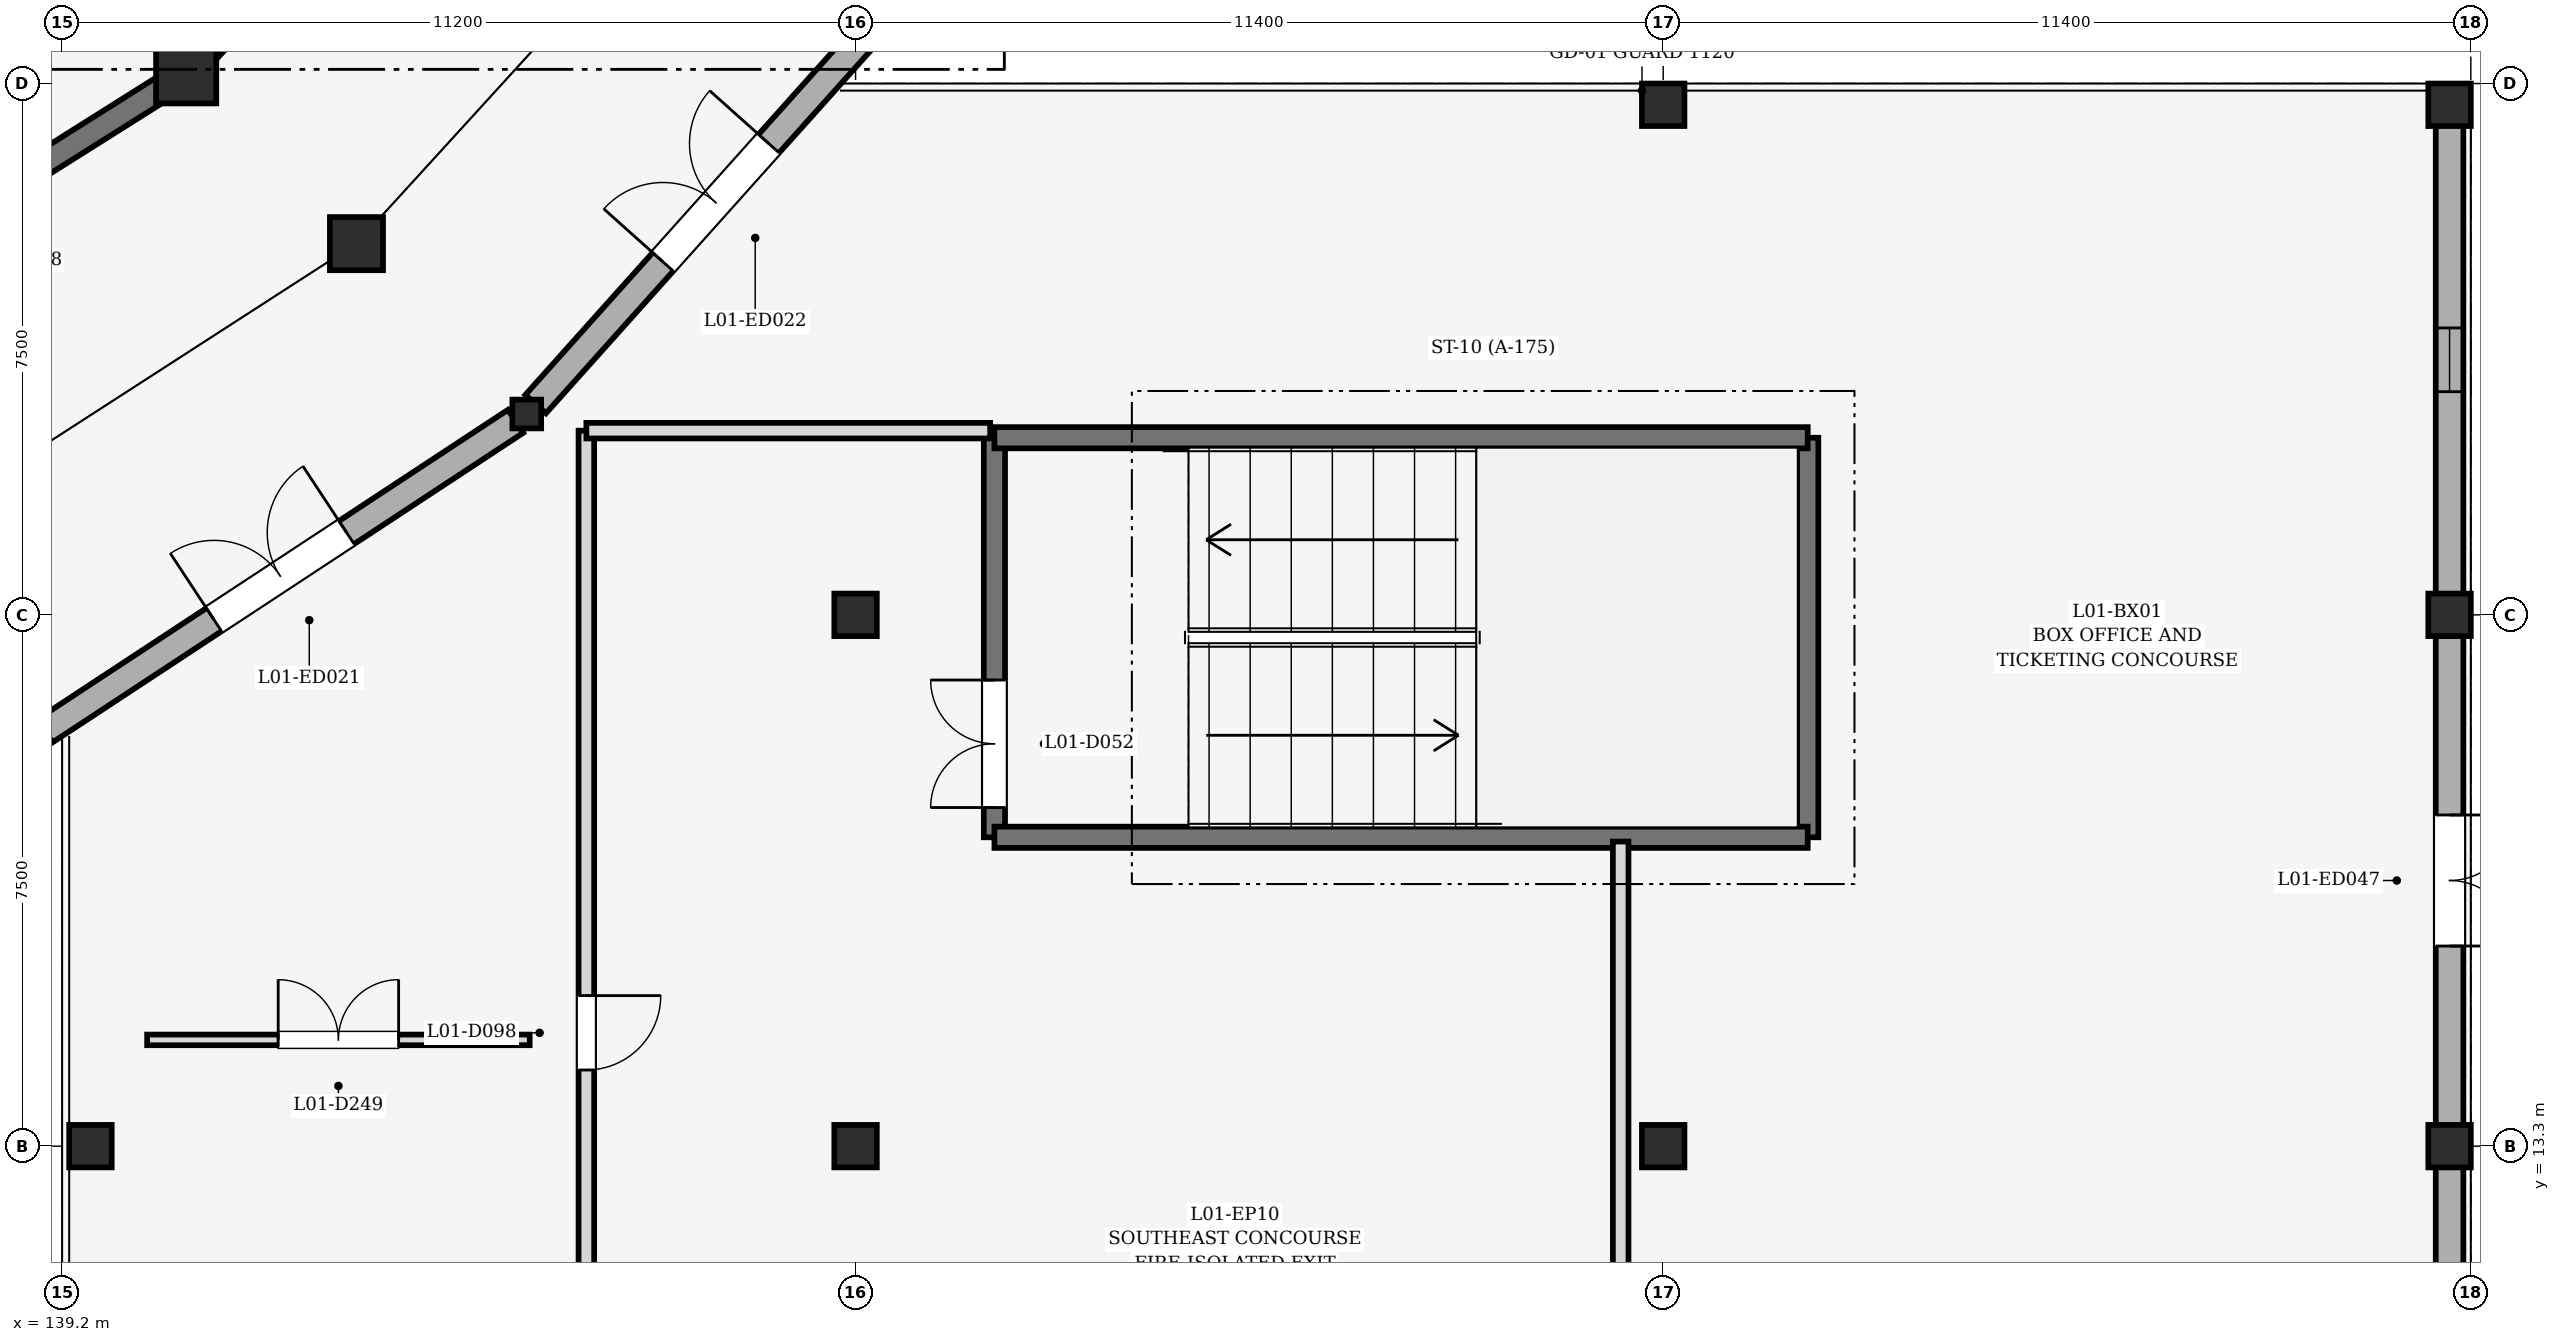
"""IFC4 building model, lengths in metres.
Left out: names, types, materials, properties, quantities, classifications, styles, units other than length and angle.
Written with IfcOpenShell. Run it as: python <this file> out.ifc"""

import sys

from ifc_helpers import new_model, si_unit, direction, frame, frame_2d, origin, origin_2d, place, context, subcontext, project, spatial, rectangle, circle, hollow_circle, extrude, element, fill, save


model = new_model("IFC4")
c1 = context("Model", 3, precision=1e-05, world=origin(), true_north=direction((0.0, 1.0)))
c2 = subcontext(c1, "Body", "Model", "MODEL_VIEW")
j1 = project(units=[si_unit("LENGTHUNIT", "METRE"), si_unit("PLANEANGLEUNIT", "RADIAN")], contexts=[c1])
p1 = place(None, origin())
s1 = spatial("IfcSite", under=j1, at=p1, CompositionType="ELEMENT")
p2 = place(p1, origin())
s2 = spatial("IfcBuilding", under=s1, at=p2, CompositionType="ELEMENT")
p3 = place(p2, origin())
s3 = spatial("IfcBuildingStorey", under=s2, at=p3, CompositionType="ELEMENT", Elevation=0.0)
p4 = place(p3, frame((140.951, 28.444, 0.0), z_axis=(0.0, 0.0, 1.0), x_axis=(1.0, 0.0, 0.0)))
e1 = element("IfcColumn", 1, at=p4, inside=s3, PredefinedType="COLUMN", context=c2, shape_type="SweptSolid", body=[
    extrude(circle(Radius=0.425, at=origin_2d()), origin(), (0.0, 0.0, 1.0), 5.4),
])
p5 = place(p3, frame((143.355, 26.04, 0.0), z_axis=(0.0, 0.0, 1.0), x_axis=(1.0, 0.0, 0.0)))
e2 = element("IfcColumn", 2, at=p5, inside=s3, PredefinedType="COLUMN", context=c2, shape_type="SweptSolid", body=[
    extrude(circle(Radius=0.375, at=origin_2d()), origin(), (0.0, 0.0, 1.0), 5.4),
])
p6 = place(p3, frame((145.759, 23.635, 0.0), z_axis=(0.0, 0.0, 1.0), x_axis=(1.0, 0.0, 0.0)))
e3 = element("IfcColumn", 3, at=p6, inside=s3, PredefinedType="COLUMN", context=c2, shape_type="SweptSolid", body=[
    extrude(hollow_circle(Radius=0.203, WallThickness=0.016, at=origin_2d()), origin(), (0.0, 0.0, 1.0), 5.4),
])
for number, where, z_axis, x_axis in (
    (4, (139.6, 13.3, 0.0), (0.0, 0.0, 1.0), (1.0, 0.0, 0.0)),
    (5, (150.4, 13.3, 0.0), (0.0, 0.0, 1.0), (1.0, 0.0, 0.0)),
    (6, (150.4, 20.8, 0.0), (0.0, 0.0, 1.0), (1.0, 0.0, 0.0)),
    (7, (161.8, 13.3, 0.0), (0.0, 0.0, 1.0), (1.0, 0.0, 0.0)),
    (8, (161.8, 28.0, 0.0), (0.0, 0.0, 1.0), (1.0, 0.0, 0.0)),
    (9, (172.9, 13.3, 0.0), (0.0, 0.0, 1.0), (1.0, 0.0, 0.0)),
    (10, (172.9, 20.8, 0.0), (0.0, 0.0, 1.0), (1.0, 0.0, 0.0)),
    (11, (172.9, 28.0, 0.0), (0.0, 0.0, 1.0), (1.0, 0.0, 0.0)),
):
    element("IfcColumn", number, at=place(p3, frame(where, z_axis=z_axis, x_axis=x_axis)), inside=s3, PredefinedType="COLUMN", context=c2, shape_type="SweptSolid", body=[
        extrude(rectangle(XDim=0.6, YDim=0.6, at=origin_2d()), origin(), (0.0, 0.0, 1.0), 5.4),
    ])
p7 = place(p3, frame((135.705, 25.139, 0.0), z_axis=(0.0, 0.0, 1.0), x_axis=(0.846151846743, 0.5329418845, 0.0)))
e12 = element("IfcWall", 12, at=p7, inside=s3, PredefinedType="SHEAR", context=c2, shape_type="SweptSolid", body=[
    extrude(rectangle(XDim=5.84, YDim=0.35, at=frame_2d((2.92, 0.0))), origin(), (0.0, 0.0, 1.0), 5.12),
])
p8 = place(p7, frame((2.36, 0.0, 0.0)))
e13 = element("IfcOpeningElement", 13, at=p8, cuts=e12, PredefinedType="OPENING", context=c2, shape_type="SweptSolid", body=[
    extrude(rectangle(XDim=1.12, YDim=2.26, at=frame_2d((0.56, 1.13))), frame((0.0, 0.187, 0.0), z_axis=(0.0, -1.0, 0.0), x_axis=(1.0, 0.0, 0.0)), (0.0, 0.0, 1.0), 0.374),
])
p9 = place(p3, frame((141.196, 28.707, 0.0), z_axis=(0.0, 0.0, 1.0), x_axis=(0.682874636689, 0.730535577893, 0.0)))
e14 = element("IfcWall", 14, at=p9, inside=s3, PredefinedType="SHEAR", context=c2, shape_type="SweptSolid", body=[
    extrude(rectangle(XDim=5.517, YDim=0.35, at=frame_2d((2.758, 0.0))), origin(), (0.0, 0.0, 1.0), 5.12),
])
p10 = place(p9, frame((2.198, 0.0, 0.0)))
e15 = element("IfcOpeningElement", 15, at=p10, cuts=e14, PredefinedType="OPENING", context=c2, shape_type="SweptSolid", body=[
    extrude(rectangle(XDim=1.12, YDim=2.26, at=frame_2d((0.56, 1.13))), frame((0.0, 0.187, 0.0), z_axis=(0.0, -1.0, 0.0), x_axis=(1.0, 0.0, 0.0)), (0.0, 0.0, 1.0), 0.374),
])
p11 = place(p3, frame((138.957, 19.162, 0.0), z_axis=(0.0, 0.0, 1.0), x_axis=(0.835481991605, 0.549517826556, 0.0)))
e16 = element("IfcWall", 16, at=p11, inside=s3, PredefinedType="STANDARD", context=c2, shape_type="SweptSolid", body=[
    extrude(rectangle(XDim=7.953, YDim=0.39, at=frame_2d((3.976, 0.0))), origin(), (0.0, 0.0, 1.0), 4.487),
])
p12 = place(p11, frame((2.856, 0.0, 0.0)))
e17 = element("IfcOpeningElement", 17, at=p12, cuts=e16, PredefinedType="OPENING", context=c2, shape_type="SweptSolid", body=[
    extrude(rectangle(XDim=2.24, YDim=2.35, at=frame_2d((1.12, 1.175))), frame((0.0, 0.207, 0.0), z_axis=(0.0, -1.0, 0.0), x_axis=(1.0, 0.0, 0.0)), (0.0, 0.0, 1.0), 0.414),
])
p13 = place(p3, frame((145.884, 23.775, 0.0), z_axis=(0.0, 0.0, 1.0), x_axis=(0.666987529742, 0.745068879479, 0.0)))
e18 = element("IfcWall", 18, at=p13, inside=s3, PredefinedType="STANDARD", context=c2, shape_type="SweptSolid", body=[
    extrude(rectangle(XDim=7.629, YDim=0.39, at=frame_2d((3.814, 0.0))), origin(), (0.0, 0.0, 1.0), 4.487),
])
p14 = place(p13, frame((2.695, 0.0, 0.0)))
e19 = element("IfcOpeningElement", 19, at=p14, cuts=e18, PredefinedType="OPENING", context=c2, shape_type="SweptSolid", body=[
    extrude(rectangle(XDim=2.24, YDim=2.35, at=frame_2d((1.12, 1.175))), frame((0.0, 0.207, 0.0), z_axis=(0.0, -1.0, 0.0), x_axis=(1.0, 0.0, 0.0)), (0.0, 0.0, 1.0), 0.414),
])
p15 = place(p3, frame((172.9, 13.015, 0.0), z_axis=(0.0, 0.0, 1.0), x_axis=(0.0, -1.0, 0.0)))
e20 = element("IfcWall", 20, at=p15, inside=s3, PredefinedType="STANDARD", context=c2, shape_type="SweptSolid", body=[
    extrude(rectangle(XDim=6.63, YDim=0.39, at=frame_2d((3.315, 0.0))), origin(), (0.0, 0.0, 1.0), 4.427),
])
p16 = place(p15, frame((2.555, 0.0, 0.85)))
e21 = element("IfcOpeningElement", 21, at=p16, cuts=e20, PredefinedType="OPENING", context=c2, shape_type="SweptSolid", body=[
    extrude(rectangle(XDim=1.52, YDim=1.75, at=frame_2d((0.76, 0.875))), frame((0.0, 0.207, 0.0), z_axis=(0.0, -1.0, 0.0), x_axis=(1.0, 0.0, 0.0)), (0.0, 0.0, 1.0), 0.414),
])
p17 = place(p3, frame((172.9, 20.515, 0.0), z_axis=(0.0, 0.0, 1.0), x_axis=(0.0, -1.0, 0.0)))
e22 = element("IfcWall", 22, at=p17, inside=s3, PredefinedType="STANDARD", context=c2, shape_type="SweptSolid", body=[
    extrude(rectangle(XDim=6.93, YDim=0.39, at=frame_2d((3.465, 0.0))), origin(), (0.0, 0.0, 1.0), 4.525),
])
p18 = place(p17, frame((2.54, 0.0, 0.0)))
e23 = element("IfcOpeningElement", 23, at=p18, cuts=e22, PredefinedType="OPENING", context=c2, shape_type="SweptSolid", body=[
    extrude(rectangle(XDim=1.85, YDim=2.25, at=frame_2d((0.925, 1.125))), frame((0.0, 0.207, 0.0), z_axis=(0.0, -1.0, 0.0), x_axis=(1.0, 0.0, 0.0)), (0.0, 0.0, 1.0), 0.414),
])
p19 = place(p3, frame((172.9, 27.715, 0.0), z_axis=(0.0, 0.0, 1.0), x_axis=(0.0, -1.0, 0.0)))
e24 = element("IfcWall", 24, at=p19, inside=s3, PredefinedType="STANDARD", context=c2, shape_type="SweptSolid", body=[
    extrude(rectangle(XDim=6.63, YDim=0.39, at=frame_2d((3.315, 0.0))), origin(), (0.0, 0.0, 1.0), 4.599),
])
p20 = place(p19, frame((2.865, 0.0, 0.85)))
e25 = element("IfcOpeningElement", 25, at=p20, cuts=e24, PredefinedType="OPENING", context=c2, shape_type="SweptSolid", body=[
    extrude(rectangle(XDim=0.9, YDim=1.5, at=frame_2d((0.45, 0.75))), frame((0.0, 0.207, 0.0), z_axis=(0.0, -1.0, 0.0), x_axis=(1.0, 0.0, 0.0)), (0.0, 0.0, 1.0), 0.414),
])
p21 = place(p3, frame((152.36, 17.66, 0.0), z_axis=(0.0, 0.0, 1.0), x_axis=(0.0, 1.0, 0.0)))
e26 = element("IfcWall", 26, at=p21, inside=s3, PredefinedType="SHEAR", context=c2, shape_type="SweptSolid", body=[
    extrude(rectangle(XDim=5.64, YDim=0.3, at=frame_2d((2.82, 0.0))), origin(), (0.0, 0.0, 1.0), 5.14),
])
p22 = place(p21, frame((0.42, 0.0, 0.0)))
e27 = element("IfcOpeningElement", 27, at=p22, cuts=e26, PredefinedType="OPENING", context=c2, shape_type="SweptSolid", body=[
    extrude(rectangle(XDim=1.8, YDim=2.2, at=frame_2d((0.9, 1.1))), frame((0.0, 0.162, 0.0), z_axis=(0.0, -1.0, 0.0), x_axis=(1.0, 0.0, 0.0)), (0.0, 0.0, 1.0), 0.324),
])
p23 = place(p3, frame((163.84, 23.3, 0.0), z_axis=(0.0, 0.0, 1.0), x_axis=(0.0, -1.0, 0.0)))
e28 = element("IfcWall", 28, at=p23, inside=s3, PredefinedType="SHEAR", context=c2, shape_type="SweptSolid", body=[
    extrude(rectangle(XDim=5.64, YDim=0.3, at=frame_2d((2.82, 0.0))), origin(), (0.0, 0.0, 1.0), 5.14),
])
for number, where, z_axis, x_axis in (
    (29, (163.84, 17.66, 0.0), (0.0, 0.0, 1.0), (-1.0, 0.0, 0.0)),
    (30, (152.36, 23.3, 0.0), (0.0, 0.0, 1.0), (1.0, 0.0, 0.0)),
):
    element("IfcWall", number, at=place(p3, frame(where, z_axis=z_axis, x_axis=x_axis)), inside=s3, PredefinedType="SHEAR", context=c2, shape_type="SweptSolid", body=[
        extrude(rectangle(XDim=11.48, YDim=0.3, at=frame_2d((5.74, 0.0))), origin(), (0.0, 0.0, 1.0), 5.14),
    ])
p24 = place(p3, frame((146.6, 23.4, 0.0), z_axis=(0.0, 0.0, 1.0), x_axis=(0.0, -1.0, 0.0)))
e31 = element("IfcWall", 31, at=p24, inside=s3, PredefinedType="SOLIDWALL", context=c2, shape_type="SweptSolid", body=[
    extrude(rectangle(XDim=17.0, YDim=0.22, at=frame_2d((8.5, 0.0))), origin(), (0.0, 0.0, 1.0), 5.125),
])
p25 = place(p24, frame((7.975, 0.0, 0.0)))
e32 = element("IfcOpeningElement", 32, at=p25, cuts=e31, PredefinedType="OPENING", context=c2, shape_type="SweptSolid", body=[
    extrude(rectangle(XDim=1.05, YDim=2.15, at=frame_2d((0.525, 1.075))), frame((0.0, 0.122, 0.0), z_axis=(0.0, -1.0, 0.0), x_axis=(1.0, 0.0, 0.0)), (0.0, 0.0, 1.0), 0.244),
])
p26 = place(p3, frame((152.3, 23.4, 0.0), z_axis=(0.0, 0.0, 1.0), x_axis=(-1.0, 0.0, 0.0)))
e33 = element("IfcWall", 33, at=p26, inside=s3, PredefinedType="SOLIDWALL", context=c2, shape_type="SweptSolid", body=[
    extrude(rectangle(XDim=5.7, YDim=0.22, at=frame_2d((2.85, 0.0))), origin(), (0.0, 0.0, 1.0), 5.125),
])
p27 = place(p3, frame((161.2, 6.4, 0.0), z_axis=(0.0, 0.0, 1.0), x_axis=(0.0, 1.0, 0.0)))
e34 = element("IfcWall", 34, at=p27, inside=s3, PredefinedType="SOLIDWALL", context=c2, shape_type="SweptSolid", body=[
    extrude(rectangle(XDim=11.2, YDim=0.22, at=frame_2d((5.6, 0.0))), origin(), (0.0, 0.0, 1.0), 5.125),
])
p28 = place(p3, frame((140.4, 14.8, 0.0), z_axis=(0.0, 0.0, 1.0), x_axis=(1.0, 0.0, 0.0)))
e35 = element("IfcWall", 35, at=p28, inside=s3, PredefinedType="PARTITIONING", context=c2, shape_type="SweptSolid", body=[
    extrude(rectangle(XDim=5.4, YDim=0.15, at=frame_2d((2.7, 0.0))), origin(), (0.0, 0.0, 1.0), 5.125),
])
p29 = place(p28, frame((1.85, 0.0, 0.0)))
e36 = element("IfcOpeningElement", 36, at=p29, cuts=e35, PredefinedType="OPENING", context=c2, shape_type="SweptSolid", body=[
    extrude(rectangle(XDim=1.7, YDim=2.2, at=frame_2d((0.85, 1.1))), frame((0.0, 0.087, 0.0), z_axis=(0.0, -1.0, 0.0), x_axis=(1.0, 0.0, 0.0)), (0.0, 0.0, 1.0), 0.174),
])
p30 = place(p12, origin())
e37 = element("IfcDoor", 37, at=p30, inside=s3, OperationType="DOUBLE_DOOR_SINGLE_SWING", PredefinedType="DOOR", context=c2, shape_type="SweptSolid", body=[
    extrude(rectangle(XDim=2.24, YDim=2.35, at=frame_2d((1.12, 1.175))), frame((0.0, 0.025, 0.0), z_axis=(0.0, -1.0, 0.0), x_axis=(1.0, 0.0, 0.0)), (0.0, 0.0, 1.0), 0.05),
])
fill(e17, e37)
p31 = place(p14, origin())
e38 = element("IfcDoor", 38, at=p31, inside=s3, OperationType="DOUBLE_DOOR_SINGLE_SWING", PredefinedType="DOOR", context=c2, shape_type="SweptSolid", body=[
    extrude(rectangle(XDim=2.24, YDim=2.35, at=frame_2d((1.12, 1.175))), frame((0.0, 0.025, 0.0), z_axis=(0.0, -1.0, 0.0), x_axis=(1.0, 0.0, 0.0)), (0.0, 0.0, 1.0), 0.05),
])
fill(e19, e38)
p32 = place(p18, origin())
e39 = element("IfcDoor", 39, at=p32, inside=s3, OperationType="DOUBLE_DOOR_SINGLE_SWING", PredefinedType="DOOR", context=c2, shape_type="SweptSolid", body=[
    extrude(rectangle(XDim=1.85, YDim=2.25, at=frame_2d((0.925, 1.125))), frame((0.0, 0.025, 0.0), z_axis=(0.0, -1.0, 0.0), x_axis=(1.0, 0.0, 0.0)), (0.0, 0.0, 1.0), 0.05),
])
fill(e23, e39)
p33 = place(p20, origin())
e40 = element("IfcWindow", 40, at=p33, inside=s3, PartitioningType="DOUBLE_PANEL_VERTICAL", PredefinedType="WINDOW", context=c2, shape_type="SweptSolid", body=[
    extrude(rectangle(XDim=0.9, YDim=1.5, at=frame_2d((0.45, 0.75))), frame((0.0, 0.03, 0.0), z_axis=(0.0, -1.0, 0.0), x_axis=(1.0, 0.0, 0.0)), (0.0, 0.0, 1.0), 0.06),
])
fill(e25, e40)
p34 = place(p22, origin())
e41 = element("IfcDoor", 41, at=p34, inside=s3, OperationType="DOUBLE_DOOR_SINGLE_SWING", PredefinedType="DOOR", context=c2, shape_type="SweptSolid", body=[
    extrude(rectangle(XDim=1.8, YDim=2.2, at=frame_2d((0.9, 1.1))), frame((0.0, 0.025, 0.0), z_axis=(0.0, -1.0, 0.0), x_axis=(1.0, 0.0, 0.0)), (0.0, 0.0, 1.0), 0.05),
])
fill(e27, e41)
p35 = place(p25, origin())
e42 = element("IfcDoor", 42, at=p35, inside=s3, OperationType="SINGLE_SWING_LEFT", PredefinedType="DOOR", context=c2, shape_type="SweptSolid", body=[
    extrude(rectangle(XDim=1.05, YDim=2.15, at=frame_2d((0.525, 1.075))), frame((0.0, 0.025, 0.0), z_axis=(0.0, -1.0, 0.0), x_axis=(1.0, 0.0, 0.0)), (0.0, 0.0, 1.0), 0.05),
])
fill(e32, e42)
p36 = place(p29, origin())
e43 = element("IfcDoor", 43, at=p36, inside=s3, OperationType="DOUBLE_DOOR_SINGLE_SWING", PredefinedType="DOOR", context=c2, shape_type="SweptSolid", body=[
    extrude(rectangle(XDim=1.7, YDim=2.2, at=frame_2d((0.85, 1.1))), frame((0.0, 0.025, 0.0), z_axis=(0.0, -1.0, 0.0), x_axis=(1.0, 0.0, 0.0)), (0.0, 0.0, 1.0), 0.05),
])
fill(e36, e43)
save(model, sys.argv[1])
